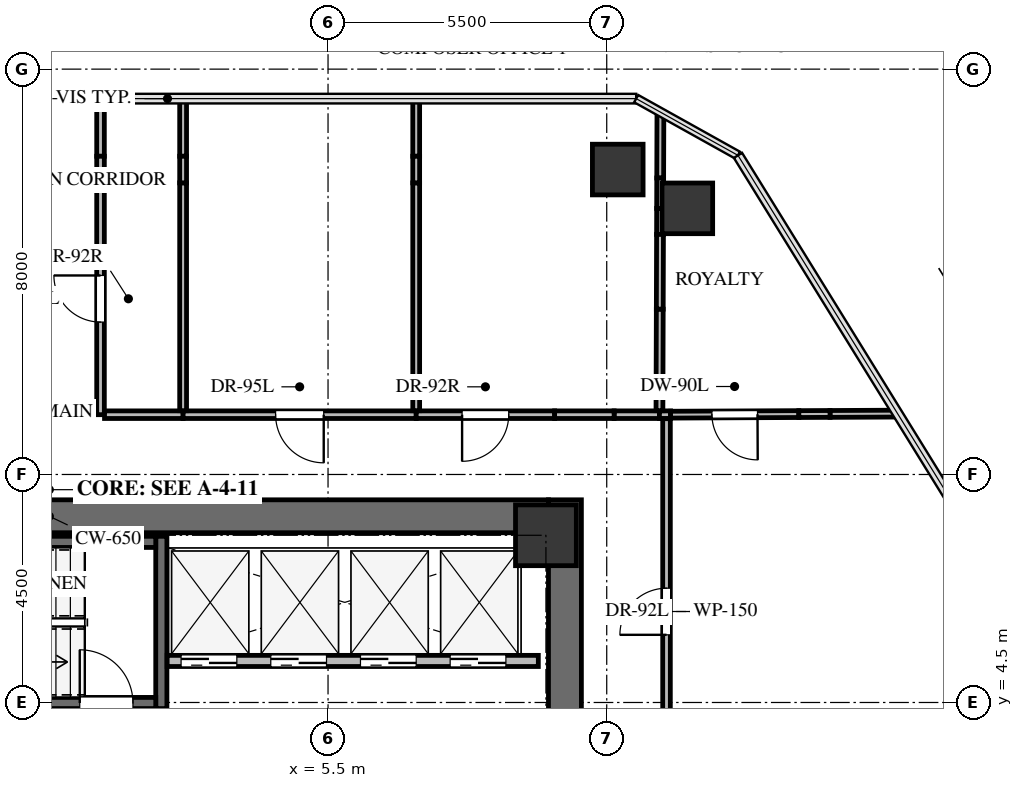
"""IFC4 building model, lengths in metres.
Left out: names, types, materials, properties, quantities, classifications, styles, units other than length and angle.
Written with IfcOpenShell. Run it as: python <this file> out.ifc"""

import sys

from ifc_helpers import new_model, si_unit, direction, frame, frame_2d, origin, origin_2d, place, context, subcontext, project, spatial, rectangle, extrude, source, transform, mapped, element, fill, save


model = new_model("IFC4")
c1 = context("Model", 3, precision=1e-05, world=origin(), true_north=direction((0.0, 1.0)))
c2 = subcontext(c1, "Body", "Model", "MODEL_VIEW")
j1 = project(units=[si_unit("LENGTHUNIT", "METRE"), si_unit("PLANEANGLEUNIT", "RADIAN")], contexts=[c1])
p1 = place(None, origin())
s1 = spatial("IfcSite", under=j1, at=p1, CompositionType="ELEMENT")
p2 = place(p1, origin())
s2 = spatial("IfcBuilding", under=s1, at=p2, CompositionType="ELEMENT")
p3 = place(p2, frame((0.0, 0.0, 206.2)))
s3 = spatial("IfcBuildingStorey", under=s2, at=p3, CompositionType="ELEMENT", Elevation=206.2)
p4 = place(p3, frame((10.175, -8.5, 0.0), z_axis=(0.0, 0.0, 1.0), x_axis=(0.0, 1.0, 0.0)))
e1 = element("IfcWall", 1, at=p4, inside=s3, PredefinedType="SHEAR", context=c2, shape_type="SweptSolid", body=[
    extrude(rectangle(XDim=17.0, YDim=0.65, at=frame_2d((8.5, 0.0))), origin(), (0.0, 0.0, 1.0), 3.0),
])
p5 = place(p3, frame((-9.85, 8.175, 0.0), z_axis=(0.0, 0.0, 1.0), x_axis=(1.0, 0.0, 0.0)))
e2 = element("IfcWall", 2, at=p5, inside=s3, PredefinedType="SHEAR", context=c2, shape_type="SweptSolid", body=[
    extrude(rectangle(XDim=19.7, YDim=0.65, at=frame_2d((9.85, 0.0))), origin(), (0.0, 0.0, 1.0), 3.0),
])
p6 = place(p3, frame((2.21, 4.38, -0.24), z_axis=(0.0, 0.0, 1.0), x_axis=(0.0, 1.0, 0.0)))
e3 = element("IfcWall", 3, at=p6, inside=s3, PredefinedType="SHEAR", context=c2, shape_type="SweptSolid", body=[
    extrude(rectangle(XDim=3.4, YDim=0.22, at=frame_2d((1.7, 0.0))), origin(), (0.0, 0.0, 1.0), 3.0),
])
p7 = place(p3, frame((-5.25, 4.49, -0.24), z_axis=(0.0, 0.0, 1.0), x_axis=(1.0, 0.0, 0.0)))
e4 = element("IfcWall", 4, at=p7, inside=s3, PredefinedType="SHEAR", context=c2, shape_type="SweptSolid", body=[
    extrude(rectangle(XDim=7.35, YDim=0.22, at=frame_2d((3.675, 0.0))), origin(), (0.0, 0.0, 1.0), 3.0),
])
p8 = place(p7, frame((5.85, 0.0, 0.0)))
e5 = element("IfcOpeningElement", 5, at=p8, cuts=e4, PredefinedType="OPENING", context=c2, shape_type="SweptSolid", body=[
    extrude(rectangle(XDim=1.05, YDim=2.15, at=frame_2d((0.525, 1.075))), frame((0.0, 0.12, 0.0), z_axis=(0.0, -1.0, 0.0), x_axis=(1.0, 0.0, 0.0)), (0.0, 0.0, 1.0), 0.24),
])
p9 = place(p3, frame((2.1, 7.67, -0.24), z_axis=(0.0, 0.0, 1.0), x_axis=(-1.0, 0.0, 0.0)))
e6 = element("IfcWall", 6, at=p9, inside=s3, PredefinedType="SHEAR", context=c2, shape_type="SweptSolid", body=[
    extrude(rectangle(XDim=7.35, YDim=0.22, at=frame_2d((3.675, 0.0))), origin(), (0.0, 0.0, 1.0), 3.0),
])
m1 = source(origin(), c2, "Body", "SweptSolid", [
    extrude(rectangle(XDim=1.2, YDim=1.2, at=origin_2d()), origin(), (0.0, 0.0, 1.0), 3.0),
])
p10 = place(p3, frame((9.8, 7.8, -0.24), z_axis=(0.0, 0.0, 1.0), x_axis=(1.0, 0.0, 0.0)))
e7 = element("IfcColumn", 7, at=p10, inside=s3, PredefinedType="COLUMN", context=c2, shape_type="MappedRepresentation", body=[
    mapped(m1, transform((0.0, 0.0, 0.0), x_axis=(1.0, 0.0, 0.0), y_axis=(0.0, 1.0, 0.0), z_axis=(0.0, 0.0, 1.0), scale=1.0)),
])
m2 = source(origin(), c2, "Body", "SweptSolid", [
    extrude(rectangle(XDim=1.0, YDim=1.0, at=origin_2d()), origin(), (0.0, 0.0, 1.0), 3.0),
])
for number, where, z_axis, x_axis in (
    (8, (11.218, 15.018, -0.24), (0.0, 0.0, 1.0), (1.0, 0.0, 0.0)),
    (9, (12.591, 14.252, -0.24), (0.0, 0.0, 1.0), (1.0, 0.0, 0.0)),
):
    element("IfcColumn", number, at=place(p3, frame(where, z_axis=z_axis, x_axis=x_axis)), inside=s3, PredefinedType="COLUMN", context=c2, shape_type="MappedRepresentation", body=[
        mapped(m2, transform((0.0, 0.0, 0.0), x_axis=(1.0, 0.0, 0.0), y_axis=(0.0, 1.0, 0.0), z_axis=(0.0, 0.0, 1.0), scale=1.0)),
    ])
p11 = place(p3, frame((2.325, 5.32, 0.0), z_axis=(0.0, 0.0, 1.0), x_axis=(1.0, 0.0, 0.0)))
e10 = element("IfcWall", 10, at=p11, inside=s3, PredefinedType="SOLIDWALL", context=c2, shape_type="SweptSolid", body=[
    extrude(rectangle(XDim=7.325, YDim=0.22, at=frame_2d((3.663, 0.0))), origin(), (0.0, 0.0, 1.0), 2.745),
])
p12 = place(p11, frame((0.275, 0.0, 0.0)))
e11 = element("IfcOpeningElement", 11, at=p12, cuts=e10, PredefinedType="OPENING", context=c2, shape_type="SweptSolid", body=[
    extrude(rectangle(XDim=1.1, YDim=2.15, at=frame_2d((0.55, 1.075))), frame((0.0, 0.12, 0.0), z_axis=(0.0, -1.0, 0.0), x_axis=(1.0, 0.0, 0.0)), (0.0, 0.0, 1.0), 0.24),
])
p13 = place(p11, frame((2.045, 0.0, 0.0)))
e12 = element("IfcOpeningElement", 12, at=p13, cuts=e10, PredefinedType="OPENING", context=c2, shape_type="SweptSolid", body=[
    extrude(rectangle(XDim=1.1, YDim=2.15, at=frame_2d((0.55, 1.075))), frame((0.0, 0.12, 0.0), z_axis=(0.0, -1.0, 0.0), x_axis=(1.0, 0.0, 0.0)), (0.0, 0.0, 1.0), 0.24),
])
p14 = place(p11, frame((3.815, 0.0, 0.0)))
e13 = element("IfcOpeningElement", 13, at=p14, cuts=e10, PredefinedType="OPENING", context=c2, shape_type="SweptSolid", body=[
    extrude(rectangle(XDim=1.1, YDim=2.15, at=frame_2d((0.55, 1.075))), frame((0.0, 0.12, 0.0), z_axis=(0.0, -1.0, 0.0), x_axis=(1.0, 0.0, 0.0)), (0.0, 0.0, 1.0), 0.24),
])
p15 = place(p11, frame((5.585, 0.0, 0.0)))
e14 = element("IfcOpeningElement", 14, at=p15, cuts=e10, PredefinedType="OPENING", context=c2, shape_type="SweptSolid", body=[
    extrude(rectangle(XDim=1.1, YDim=2.15, at=frame_2d((0.55, 1.075))), frame((0.0, 0.12, 0.0), z_axis=(0.0, -1.0, 0.0), x_axis=(1.0, 0.0, 0.0)), (0.0, 0.0, 1.0), 0.24),
])
p16 = place(p3, frame((1.01, 10.18, 0.0), z_axis=(0.0, 0.0, 1.0), x_axis=(0.0, 1.0, 0.0)))
e15 = element("IfcWall", 15, at=p16, inside=s3, PredefinedType="PARTITIONING", context=c2, shape_type="SweptSolid", body=[
    extrude(rectangle(XDim=4.575, YDim=0.15, at=frame_2d((2.288, 0.0))), origin(), (0.0, 0.0, 1.0), 2.745),
])
p17 = place(p16, frame((1.828, 0.0, 0.0)))
e16 = element("IfcOpeningElement", 16, at=p17, cuts=e15, PredefinedType="OPENING", context=c2, shape_type="SweptSolid", body=[
    extrude(rectangle(XDim=0.92, YDim=2.1, at=frame_2d((0.46, 1.05))), frame((0.0, 0.085, 0.0), z_axis=(0.0, -1.0, 0.0), x_axis=(1.0, 0.0, 0.0)), (0.0, 0.0, 1.0), 0.17),
])
p18 = place(p3, frame((1.01, 15.281, 0.0), z_axis=(0.0, 0.0, 1.0), x_axis=(0.0, 1.0, 0.0)))
e17 = element("IfcWall", 17, at=p18, inside=s3, PredefinedType="PARTITIONING", context=c2, shape_type="SweptSolid", body=[
    extrude(rectangle(XDim=1.137, YDim=0.15, at=frame_2d((0.569, 0.0))), origin(), (0.0, 0.0, 1.0), 2.745),
])
p19 = place(p3, frame((1.01, 14.755, 0.0), z_axis=(0.0, 0.0, 1.0), x_axis=(0.0, 1.0, 0.0)))
e18 = element("IfcWall", 18, at=p19, inside=s3, PredefinedType="PARTITIONING", context=c2, shape_type="SweptSolid", body=[
    extrude(rectangle(XDim=0.525, YDim=0.15, at=frame_2d((0.263, 0.0))), origin(), (0.0, 0.0, 1.0), 2.099),
])
p20 = place(p3, frame((2.64, 10.18, 0.0), z_axis=(0.0, 0.0, 1.0), x_axis=(-1.0, 0.0, 0.0)))
e19 = element("IfcWall", 19, at=p20, inside=s3, PredefinedType="PARTITIONING", context=c2, shape_type="SweptSolid", body=[
    extrude(rectangle(XDim=1.551, YDim=0.15, at=frame_2d((0.775, 0.0))), origin(), (0.0, 0.0, 1.0), 2.745),
])
p21 = place(p3, frame((7.24, 10.18, 0.0), z_axis=(0.0, 0.0, 1.0), x_axis=(-1.0, 0.0, 0.0)))
e20 = element("IfcWall", 20, at=p21, inside=s3, PredefinedType="PARTITIONING", context=c2, shape_type="SweptSolid", body=[
    extrude(rectangle(XDim=4.6, YDim=0.15, at=frame_2d((2.3, 0.0))), origin(), (0.0, 0.0, 1.0), 2.308),
])
p22 = place(p21, frame((1.825, 0.0, 0.0)))
e21 = element("IfcOpeningElement", 21, at=p22, cuts=e20, PredefinedType="OPENING", context=c2, shape_type="SweptSolid", body=[
    extrude(rectangle(XDim=0.95, YDim=2.1, at=frame_2d((0.475, 1.05))), frame((0.0, 0.085, 0.0), z_axis=(0.0, -1.0, 0.0), x_axis=(1.0, 0.0, 0.0)), (0.0, 0.0, 1.0), 0.17),
])
p23 = place(p3, frame((12.04, 10.18, 0.0), z_axis=(0.0, 0.0, 1.0), x_axis=(-1.0, 0.0, 0.0)))
e22 = element("IfcWall", 22, at=p23, inside=s3, PredefinedType="PARTITIONING", context=c2, shape_type="SweptSolid", body=[
    extrude(rectangle(XDim=0.894, YDim=0.15, at=frame_2d((0.447, 0.0))), origin(), (0.0, 0.0, 1.0), 2.745),
])
p24 = place(p3, frame((9.971, 10.18, 0.0), z_axis=(0.0, 0.0, 1.0), x_axis=(-1.0, 0.0, 0.0)))
e23 = element("IfcWall", 23, at=p24, inside=s3, PredefinedType="PARTITIONING", context=c2, shape_type="SweptSolid", body=[
    extrude(rectangle(XDim=2.731, YDim=0.15, at=frame_2d((1.366, 0.0))), origin(), (0.0, 0.0, 1.0), 2.745),
])
p25 = place(p24, frame((0.906, 0.0, 0.0)))
e24 = element("IfcOpeningElement", 24, at=p25, cuts=e23, PredefinedType="OPENING", context=c2, shape_type="SweptSolid", body=[
    extrude(rectangle(XDim=0.92, YDim=2.1, at=frame_2d((0.46, 1.05))), frame((0.0, 0.085, 0.0), z_axis=(0.0, -1.0, 0.0), x_axis=(1.0, 0.0, 0.0)), (0.0, 0.0, 1.0), 0.17),
])
p26 = place(p3, frame((11.146, 10.18, 0.0), z_axis=(0.0, 0.0, 1.0), x_axis=(-1.0, 0.0, 0.0)))
e25 = element("IfcWall", 25, at=p26, inside=s3, PredefinedType="PARTITIONING", context=c2, shape_type="SweptSolid", body=[
    extrude(rectangle(XDim=1.174, YDim=0.15, at=frame_2d((0.587, 0.0))), origin(), (0.0, 0.0, 1.0), 1.942),
])
p27 = place(p3, frame((12.26, 10.18, 0.0), z_axis=(0.0, 0.0, 1.0), x_axis=(-1.0, 0.0, 0.0)))
e26 = element("IfcWall", 26, at=p27, inside=s3, PredefinedType="PARTITIONING", context=c2, shape_type="SweptSolid", body=[
    extrude(rectangle(XDim=0.22, YDim=0.15, at=frame_2d((0.11, 0.0))), origin(), (0.0, 0.0, 1.0), 2.745),
])
p28 = place(p3, frame((12.18, 2.49, 0.0), z_axis=(0.0, 0.0, 1.0), x_axis=(0.0, 1.0, 0.0)))
e27 = element("IfcWall", 27, at=p28, inside=s3, PredefinedType="PARTITIONING", context=c2, shape_type="SweptSolid", body=[
    extrude(rectangle(XDim=7.611, YDim=0.15, at=frame_2d((3.806, 0.0))), origin(), (0.0, 0.0, 1.0), 2.745),
])
p29 = place(p28, frame((3.345, 0.0, 0.0)))
e28 = element("IfcOpeningElement", 28, at=p29, cuts=e27, PredefinedType="OPENING", context=c2, shape_type="SweptSolid", body=[
    extrude(rectangle(XDim=0.92, YDim=2.1, at=frame_2d((0.46, 1.05))), frame((0.0, 0.085, 0.0), z_axis=(0.0, -1.0, 0.0), x_axis=(1.0, 0.0, 0.0)), (0.0, 0.0, 1.0), 0.17),
])
p30 = place(p3, frame((2.64, 16.418, 0.0), z_axis=(0.0, 0.0, 1.0), x_axis=(0.0, -1.0, 0.0)))
e29 = element("IfcWall", 29, at=p30, inside=s3, PredefinedType="PARTITIONING", context=c2, shape_type="SweptSolid", body=[
    extrude(rectangle(XDim=1.137, YDim=0.135, at=frame_2d((0.569, 0.0))), origin(), (0.0, 0.0, 1.0), 2.745),
])
p31 = place(p3, frame((2.64, 14.755, 0.0), z_axis=(0.0, 0.0, 1.0), x_axis=(0.0, -1.0, 0.0)))
e30 = element("IfcWall", 30, at=p31, inside=s3, PredefinedType="PARTITIONING", context=c2, shape_type="SweptSolid", body=[
    extrude(rectangle(XDim=4.496, YDim=0.135, at=frame_2d((2.248, 0.0))), origin(), (0.0, 0.0, 1.0), 2.745),
])
p32 = place(p3, frame((2.64, 15.281, 0.0), z_axis=(0.0, 0.0, 1.0), x_axis=(0.0, -1.0, 0.0)))
e31 = element("IfcWall", 31, at=p32, inside=s3, PredefinedType="PARTITIONING", context=c2, shape_type="SweptSolid", body=[
    extrude(rectangle(XDim=0.525, YDim=0.135, at=frame_2d((0.263, 0.0))), origin(), (0.0, 0.0, 1.0), 2.099),
])
p33 = place(p3, frame((7.24, 16.418, 0.0), z_axis=(0.0, 0.0, 1.0), x_axis=(0.0, -1.0, 0.0)))
e32 = element("IfcWall", 32, at=p33, inside=s3, PredefinedType="PARTITIONING", context=c2, shape_type="SweptSolid", body=[
    extrude(rectangle(XDim=1.137, YDim=0.135, at=frame_2d((0.569, 0.0))), origin(), (0.0, 0.0, 1.0), 2.745),
])
p34 = place(p3, frame((7.24, 14.755, 0.0), z_axis=(0.0, 0.0, 1.0), x_axis=(0.0, -1.0, 0.0)))
e33 = element("IfcWall", 33, at=p34, inside=s3, PredefinedType="PARTITIONING", context=c2, shape_type="SweptSolid", body=[
    extrude(rectangle(XDim=4.496, YDim=0.135, at=frame_2d((2.248, 0.0))), origin(), (0.0, 0.0, 1.0), 2.745),
])
p35 = place(p3, frame((7.24, 15.281, 0.0), z_axis=(0.0, 0.0, 1.0), x_axis=(0.0, -1.0, 0.0)))
e34 = element("IfcWall", 34, at=p35, inside=s3, PredefinedType="PARTITIONING", context=c2, shape_type="SweptSolid", body=[
    extrude(rectangle(XDim=0.525, YDim=0.135, at=frame_2d((0.263, 0.0))), origin(), (0.0, 0.0, 1.0), 2.099),
])
p36 = place(p3, frame((12.06, 16.151, 0.0), z_axis=(0.0, 0.0, 1.0), x_axis=(-0.003193071626, -0.999994902134, 0.0)))
e35 = element("IfcWall", 35, at=p36, inside=s3, PredefinedType="PARTITIONING", context=c2, shape_type="SweptSolid", body=[
    extrude(rectangle(XDim=1.3, YDim=0.135, at=frame_2d((0.65, 0.0))), origin(), (0.0, 0.0, 1.0), 2.745),
])
p37 = place(p3, frame((12.053, 14.251, 0.0), z_axis=(0.0, 0.0, 1.0), x_axis=(-0.003323818297, -0.999994476101, 0.0)))
e36 = element("IfcWall", 36, at=p37, inside=s3, PredefinedType="PARTITIONING", context=c2, shape_type="SweptSolid", body=[
    extrude(rectangle(XDim=0.514, YDim=0.135, at=frame_2d((0.257, 0.0))), origin(), (0.0, 0.0, 1.0), 1.942),
])
p38 = place(p3, frame((12.047, 12.263, 0.0), z_axis=(0.0, 0.0, 1.0), x_axis=(-0.003288654567, -0.999994592361, 0.0)))
e37 = element("IfcWall", 37, at=p38, inside=s3, PredefinedType="PARTITIONING", context=c2, shape_type="SweptSolid", body=[
    extrude(rectangle(XDim=2.004, YDim=0.135, at=frame_2d((1.002, 0.0))), origin(), (0.0, 0.0, 1.0), 1.942),
])
p39 = place(p3, frame((12.055, 14.852, 0.0), z_axis=(0.0, 0.0, 1.0), x_axis=(-0.003661488881, -0.999993296727, 0.0)))
e38 = element("IfcWall", 38, at=p39, inside=s3, PredefinedType="PARTITIONING", context=c2, shape_type="SweptSolid", body=[
    extrude(rectangle(XDim=0.6, YDim=0.135, at=frame_2d((0.3, 0.0))), origin(), (0.0, 0.0, 1.0), 2.099),
])
p40 = place(p3, frame((12.052, 13.737, 0.0), z_axis=(0.0, 0.0, 1.0), x_axis=(-0.003147242985, -0.999995047419, 0.0)))
e39 = element("IfcWall", 39, at=p40, inside=s3, PredefinedType="PARTITIONING", context=c2, shape_type="SweptSolid", body=[
    extrude(rectangle(XDim=1.474, YDim=0.135, at=frame_2d((0.737, 0.0))), origin(), (0.0, 0.0, 1.0), 1.942),
])
p41 = place(p3, frame((16.74, 10.201, 0.0), z_axis=(0.0, 0.0, 1.0), x_axis=(-0.999989521507, -0.004577868163, 0.0)))
e40 = element("IfcWall", 40, at=p41, inside=s3, PredefinedType="PARTITIONING", context=c2, shape_type="SweptSolid", body=[
    extrude(rectangle(XDim=1.333, YDim=0.135, at=frame_2d((0.667, 0.0))), origin(), (0.0, 0.0, 1.0), 2.745),
])
p42 = place(p3, frame((14.791, 10.192, 0.0), z_axis=(0.0, 0.0, 1.0), x_axis=(-0.999989725302, -0.004533132435, 0.0)))
e41 = element("IfcWall", 41, at=p42, inside=s3, PredefinedType="PARTITIONING", context=c2, shape_type="SweptSolid", body=[
    extrude(rectangle(XDim=2.531, YDim=0.135, at=frame_2d((1.266, 0.0))), origin(), (0.0, 0.0, 1.0), 2.745),
])
p43 = place(p42, frame((0.816, 0.0, 0.0)))
e42 = element("IfcOpeningElement", 42, at=p43, cuts=e41, PredefinedType="OPENING", context=c2, shape_type="SweptSolid", body=[
    extrude(rectangle(XDim=0.9, YDim=2.05, at=frame_2d((0.45, 1.025))), frame((0.0, 0.078, 0.0), z_axis=(0.0, -1.0, 0.0), x_axis=(1.0, 0.0, 0.0)), (0.0, 0.0, 1.0), 0.155),
])
p44 = place(p3, frame((15.407, 10.195, 0.0), z_axis=(0.0, 0.0, 1.0), x_axis=(-0.999988671317, -0.004759961942, 0.0)))
e43 = element("IfcWall", 43, at=p44, inside=s3, PredefinedType="PARTITIONING", context=c2, shape_type="SweptSolid", body=[
    extrude(rectangle(XDim=0.615, YDim=0.135, at=frame_2d((0.308, 0.0))), origin(), (0.0, 0.0, 1.0), 2.099),
])
m3 = source(origin(), c2, "Body", "SweptSolid", [
    extrude(rectangle(XDim=1.05, YDim=2.15, at=frame_2d((0.525, 1.075))), frame((0.0, 0.025, 0.0), z_axis=(0.0, -1.0, 0.0), x_axis=(1.0, 0.0, 0.0)), (0.0, 0.0, 1.0), 0.05),
])
p45 = place(p8, origin())
e44 = element("IfcDoor", 44, at=p45, inside=s3, OperationType="SINGLE_SWING_LEFT", PredefinedType="DOOR", context=c2, shape_type="MappedRepresentation", body=[
    mapped(m3, transform((0.0, 0.0, 0.0), x_axis=(1.0, 0.0, 0.0), y_axis=(0.0, 1.0, 0.0), z_axis=(0.0, 0.0, 1.0), scale=1.0)),
])
fill(e5, e44)
m4 = source(origin(), c2, "Body", "SweptSolid", [
    extrude(rectangle(XDim=1.1, YDim=2.15, at=frame_2d((0.55, 1.075))), frame((0.0, 0.025, 0.0), z_axis=(0.0, -1.0, 0.0), x_axis=(1.0, 0.0, 0.0)), (0.0, 0.0, 1.0), 0.05),
])
p46 = place(p12, origin())
e45 = element("IfcDoor", 45, at=p46, inside=s3, OperationType="DOUBLE_DOOR_SLIDING", PredefinedType="DOOR", context=c2, shape_type="MappedRepresentation", body=[
    mapped(m4, transform((0.0, 0.0, 0.0), x_axis=(1.0, 0.0, 0.0), y_axis=(0.0, 1.0, 0.0), z_axis=(0.0, 0.0, 1.0), scale=1.0)),
])
fill(e11, e45)
p47 = place(p13, origin())
e46 = element("IfcDoor", 46, at=p47, inside=s3, OperationType="DOUBLE_DOOR_SLIDING", PredefinedType="DOOR", context=c2, shape_type="MappedRepresentation", body=[
    mapped(m4, transform((0.0, 0.0, 0.0), x_axis=(1.0, 0.0, 0.0), y_axis=(0.0, 1.0, 0.0), z_axis=(0.0, 0.0, 1.0), scale=1.0)),
])
fill(e12, e46)
p48 = place(p14, origin())
e47 = element("IfcDoor", 47, at=p48, inside=s3, OperationType="DOUBLE_DOOR_SLIDING", PredefinedType="DOOR", context=c2, shape_type="MappedRepresentation", body=[
    mapped(m4, transform((0.0, 0.0, 0.0), x_axis=(1.0, 0.0, 0.0), y_axis=(0.0, 1.0, 0.0), z_axis=(0.0, 0.0, 1.0), scale=1.0)),
])
fill(e13, e47)
p49 = place(p15, origin())
e48 = element("IfcDoor", 48, at=p49, inside=s3, OperationType="DOUBLE_DOOR_SLIDING", PredefinedType="DOOR", context=c2, shape_type="MappedRepresentation", body=[
    mapped(m4, transform((0.0, 0.0, 0.0), x_axis=(1.0, 0.0, 0.0), y_axis=(0.0, 1.0, 0.0), z_axis=(0.0, 0.0, 1.0), scale=1.0)),
])
fill(e14, e48)
m5 = source(origin(), c2, "Body", "SweptSolid", [
    extrude(rectangle(XDim=0.92, YDim=2.1, at=frame_2d((0.46, 1.05))), frame((0.0, 0.025, 0.0), z_axis=(0.0, -1.0, 0.0), x_axis=(1.0, 0.0, 0.0)), (0.0, 0.0, 1.0), 0.05),
])
p50 = place(p17, origin())
e49 = element("IfcDoor", 49, at=p50, inside=s3, OperationType="SINGLE_SWING_RIGHT", PredefinedType="DOOR", context=c2, shape_type="MappedRepresentation", body=[
    mapped(m5, transform((0.0, 0.0, 0.0), x_axis=(1.0, 0.0, 0.0), y_axis=(0.0, 1.0, 0.0), z_axis=(0.0, 0.0, 1.0), scale=1.0)),
])
fill(e16, e49)
m6 = source(origin(), c2, "Body", "SweptSolid", [
    extrude(rectangle(XDim=0.95, YDim=2.1, at=frame_2d((0.475, 1.05))), frame((0.0, 0.025, 0.0), z_axis=(0.0, -1.0, 0.0), x_axis=(1.0, 0.0, 0.0)), (0.0, 0.0, 1.0), 0.05),
])
p51 = place(p22, origin())
e50 = element("IfcDoor", 50, at=p51, inside=s3, OperationType="SINGLE_SWING_LEFT", PredefinedType="DOOR", context=c2, shape_type="MappedRepresentation", body=[
    mapped(m6, transform((0.0, 0.0, 0.0), x_axis=(1.0, 0.0, 0.0), y_axis=(0.0, 1.0, 0.0), z_axis=(0.0, 0.0, 1.0), scale=1.0)),
])
fill(e21, e50)
p52 = place(p25, origin())
e51 = element("IfcDoor", 51, at=p52, inside=s3, OperationType="SINGLE_SWING_RIGHT", PredefinedType="DOOR", context=c2, shape_type="MappedRepresentation", body=[
    mapped(m5, transform((0.0, 0.0, 0.0), x_axis=(1.0, 0.0, 0.0), y_axis=(0.0, 1.0, 0.0), z_axis=(0.0, 0.0, 1.0), scale=1.0)),
])
fill(e24, e51)
m7 = source(origin(), c2, "Body", "SweptSolid", [
    extrude(rectangle(XDim=0.92, YDim=2.1, at=frame_2d((0.46, 1.05))), frame((0.0, 0.025, 0.0), z_axis=(0.0, -1.0, 0.0), x_axis=(1.0, 0.0, 0.0)), (0.0, 0.0, 1.0), 0.05),
])
p53 = place(p29, origin())
e52 = element("IfcDoor", 52, at=p53, inside=s3, OperationType="SINGLE_SWING_LEFT", PredefinedType="DOOR", context=c2, shape_type="MappedRepresentation", body=[
    mapped(m7, transform((0.0, 0.0, 0.0), x_axis=(1.0, 0.0, 0.0), y_axis=(0.0, 1.0, 0.0), z_axis=(0.0, 0.0, 1.0), scale=1.0)),
])
fill(e28, e52)
m8 = source(origin(), c2, "Body", "SweptSolid", [
    extrude(rectangle(XDim=0.9, YDim=2.05, at=frame_2d((0.45, 1.025))), frame((0.0, 0.025, 0.0), z_axis=(0.0, -1.0, 0.0), x_axis=(1.0, 0.0, 0.0)), (0.0, 0.0, 1.0), 0.05),
])
p54 = place(p43, origin())
e53 = element("IfcDoor", 53, at=p54, inside=s3, OperationType="SINGLE_SWING_LEFT", PredefinedType="DOOR", context=c2, shape_type="MappedRepresentation", body=[
    mapped(m8, transform((0.0, 0.0, 0.0), x_axis=(1.0, 0.0, 0.0), y_axis=(0.0, 1.0, 0.0), z_axis=(0.0, 0.0, 1.0), scale=1.0)),
])
fill(e42, e53)
save(model, sys.argv[1])
